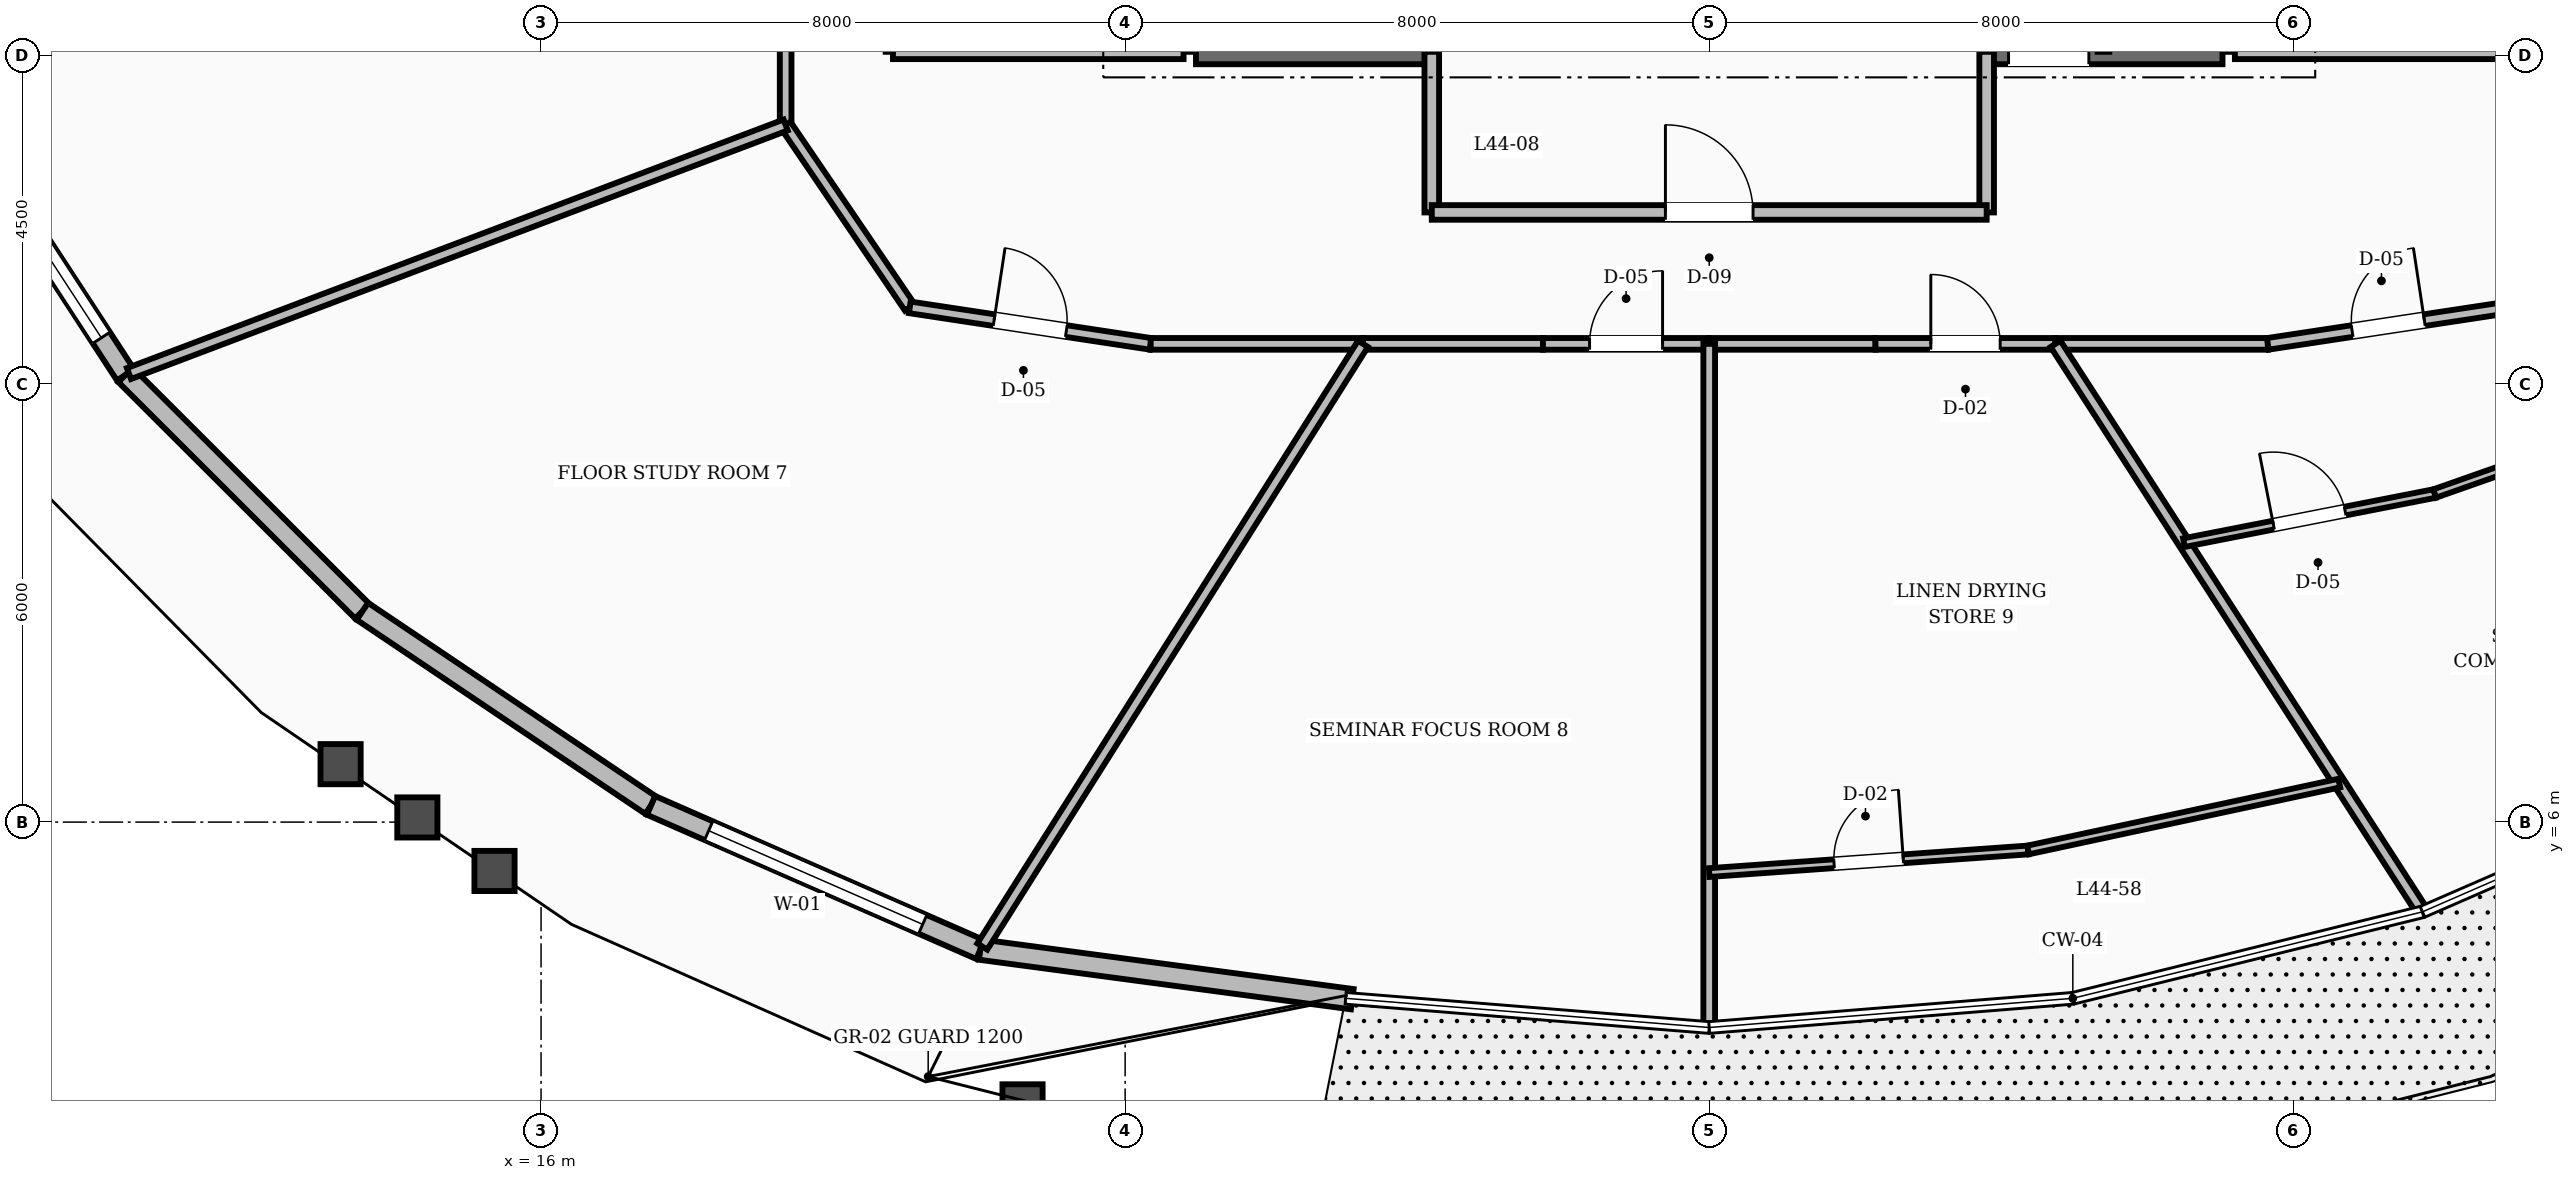
"""IFC4 building model, lengths in metres.
Left out: names, types, materials, properties, quantities, classifications, styles, units other than length and angle.
Written with IfcOpenShell. Run it as: python <this file> out.ifc"""

import sys

from ifc_helpers import new_model, si_unit, direction, frame, frame_2d, origin, place, context, subcontext, project, spatial, rectangle, extrude, element, fill, save


model = new_model("IFC4")
c1 = context("Model", 3, precision=1e-05, world=origin(), true_north=direction((0.0, 1.0)))
c2 = subcontext(c1, "Body", "Model", "MODEL_VIEW")
j1 = project(units=[si_unit("LENGTHUNIT", "METRE"), si_unit("PLANEANGLEUNIT", "RADIAN")], contexts=[c1])
p1 = place(None, origin())
s1 = spatial("IfcSite", under=j1, at=p1, CompositionType="ELEMENT")
p2 = place(p1, origin())
s2 = spatial("IfcBuilding", under=s1, at=p2, CompositionType="ELEMENT")
p3 = place(p2, frame((0.0, 0.0, 171.2)))
s3 = spatial("IfcBuildingStorey", under=s2, at=p3, CompositionType="ELEMENT", Elevation=171.2)
p4 = place(p3, frame((24.97, 16.55, 0.0), z_axis=(0.0, 0.0, 1.0), x_axis=(1.0, 0.0, 0.0)))
e1 = element("IfcWall", 1, at=p4, inside=s3, PredefinedType="SHEAR", context=c2, shape_type="SweptSolid", body=[
    extrude(rectangle(XDim=3.23, YDim=0.34, at=frame_2d((1.615, 0.0))), origin(), (0.0, 0.0, 1.0), 3.6),
])
p5 = place(p3, frame((35.8, 16.55, 0.0), z_axis=(0.0, 0.0, 1.0), x_axis=(1.0, 0.0, 0.0)))
e2 = element("IfcWall", 2, at=p5, inside=s3, PredefinedType="SHEAR", context=c2, shape_type="SweptSolid", body=[
    extrude(rectangle(XDim=3.23, YDim=0.34, at=frame_2d((1.615, 0.0))), origin(), (0.0, 0.0, 1.0), 3.6),
])
p6 = place(p5, frame((0.3, 0.0, 0.0)))
e3 = element("IfcOpeningElement", 3, at=p6, cuts=e2, PredefinedType="OPENING", context=c2, shape_type="SweptSolid", body=[
    extrude(rectangle(XDim=1.1, YDim=2.1, at=frame_2d((0.55, 1.05))), frame((0.0, 0.18, 0.0), z_axis=(0.0, -1.0, 0.0), x_axis=(1.0, 0.0, 0.0)), (0.0, 0.0, 1.0), 0.36),
])
p7 = place(p3, frame((7.898, 15.821, 0.0), z_axis=(0.0, 0.0, 1.0), x_axis=(0.546411241489, -0.837517017841, 0.0)))
e4 = element("IfcWall", 4, at=p7, inside=s3, PredefinedType="STANDARD", context=c2, shape_type="SweptSolid", body=[
    extrude(rectangle(XDim=4.412, YDim=0.28, at=frame_2d((2.206, 0.0))), origin(), (0.0, 0.0, 1.0), 2.82),
])
p8 = place(p7, frame((0.606, 0.0, 0.8)))
e5 = element("IfcOpeningElement", 5, at=p8, cuts=e4, PredefinedType="OPENING", context=c2, shape_type="SweptSolid", body=[
    extrude(rectangle(XDim=3.2, YDim=1.65, at=frame_2d((1.6, 0.825))), frame((0.0, 0.15, 0.0), z_axis=(0.0, -1.0, 0.0), x_axis=(1.0, 0.0, 0.0)), (0.0, 0.0, 1.0), 0.3),
])
p9 = place(p3, frame((10.309, 12.125, 0.0), z_axis=(0.0, 0.0, 1.0), x_axis=(0.707692376563, -0.706520700443, 0.0)))
e6 = element("IfcWall", 6, at=p9, inside=s3, PredefinedType="STANDARD", context=c2, shape_type="SweptSolid", body=[
    extrude(rectangle(XDim=4.584, YDim=0.28, at=frame_2d((2.292, 0.0))), origin(), (0.0, 0.0, 1.0), 2.82),
])
p10 = place(p3, frame((13.553, 8.887, 0.0), z_axis=(0.0, 0.0, 1.0), x_axis=(0.82985197946, -0.557983594909, 0.0)))
e7 = element("IfcWall", 7, at=p10, inside=s3, PredefinedType="STANDARD", context=c2, shape_type="SweptSolid", body=[
    extrude(rectangle(XDim=4.764, YDim=0.28, at=frame_2d((2.382, 0.0))), origin(), (0.0, 0.0, 1.0), 2.82),
])
p11 = place(p3, frame((17.506, 6.229, 0.0), z_axis=(0.0, 0.0, 1.0), x_axis=(0.916018444192, -0.401136148832, 0.0)))
e8 = element("IfcWall", 8, at=p11, inside=s3, PredefinedType="STANDARD", context=c2, shape_type="SweptSolid", body=[
    extrude(rectangle(XDim=4.924, YDim=0.28, at=frame_2d((2.462, 0.0))), origin(), (0.0, 0.0, 1.0), 2.82),
])
p12 = place(p11, frame((0.862, 0.0, 0.8)))
e9 = element("IfcOpeningElement", 9, at=p12, cuts=e8, PredefinedType="OPENING", context=c2, shape_type="SweptSolid", body=[
    extrude(rectangle(XDim=3.2, YDim=1.65, at=frame_2d((1.6, 0.825))), frame((0.0, 0.15, 0.0), z_axis=(0.0, -1.0, 0.0), x_axis=(1.0, 0.0, 0.0)), (0.0, 0.0, 1.0), 0.3),
])
p13 = place(p3, frame((22.017, 4.253, 0.0), z_axis=(0.0, 0.0, 1.0), x_axis=(0.991229560072, -0.132151274075, 0.0)))
e10 = element("IfcWall", 10, at=p13, inside=s3, PredefinedType="STANDARD", context=c2, shape_type="SweptSolid", body=[
    extrude(rectangle(XDim=5.14, YDim=0.28, at=frame_2d((2.57, 0.0))), origin(), (0.0, 0.0, 1.0), 2.82),
])
for number, where, z_axis, x_axis in (
    (11, (20.82, 16.55, 0.0), (0.0, 0.0, 1.0), (1.0, 0.0, 0.0)),
    (12, (39.2, 16.55, 0.0), (0.0, 0.0, 1.0), (1.0, 0.0, 0.0)),
):
    element("IfcWall", number, at=place(p3, frame(where, z_axis=z_axis, x_axis=x_axis)), inside=s3, PredefinedType="SOLIDWALL", context=c2, shape_type="SweptSolid", body=[
        extrude(rectangle(XDim=3.98, YDim=0.2, at=frame_2d((1.99, 0.0))), origin(), (0.0, 0.0, 1.0), 2.8),
    ])
for number, where, z_axis, x_axis in (
    (13, (28.2, 14.35, 0.0), (0.0, 0.0, 1.0), (0.0, 1.0, 0.0)),
    (14, (35.8, 14.35, 0.0), (0.0, 0.0, 1.0), (0.0, 1.0, 0.0)),
):
    element("IfcWall", number, at=place(p3, frame(where, z_axis=z_axis, x_axis=x_axis)), inside=s3, PredefinedType="SOLIDWALL", context=c2, shape_type="SweptSolid", body=[
        extrude(rectangle(XDim=2.2, YDim=0.2, at=frame_2d((1.1, 0.0))), origin(), (0.0, 0.0, 1.0), 2.8),
    ])
p14 = place(p3, frame((28.2, 14.35, 0.0), z_axis=(0.0, 0.0, 1.0), x_axis=(1.0, 0.0, 0.0)))
e15 = element("IfcWall", 15, at=p14, inside=s3, PredefinedType="SOLIDWALL", context=c2, shape_type="SweptSolid", body=[
    extrude(rectangle(XDim=7.6, YDim=0.2, at=frame_2d((3.8, 0.0))), origin(), (0.0, 0.0, 1.0), 2.8),
])
p15 = place(p14, frame((3.2, 0.0, 0.0)))
e16 = element("IfcOpeningElement", 16, at=p15, cuts=e15, PredefinedType="OPENING", context=c2, shape_type="SweptSolid", body=[
    extrude(rectangle(XDim=1.2, YDim=2.1, at=frame_2d((0.6, 1.05))), frame((0.0, 0.11, 0.0), z_axis=(0.0, -1.0, 0.0), x_axis=(1.0, 0.0, 0.0)), (0.0, 0.0, 1.0), 0.22),
])
p16 = place(p3, frame((19.35, 18.76, 0.0), z_axis=(0.0, 0.0, 1.0), x_axis=(0.0, -1.0, 0.0)))
e17 = element("IfcWall", 17, at=p16, inside=s3, PredefinedType="SOLIDWALL", context=c2, shape_type="SweptSolid", body=[
    extrude(rectangle(XDim=3.213, YDim=0.16, at=frame_2d((1.606, 0.0))), origin(), (0.0, 0.0, 1.0), 2.8),
])
p17 = place(p3, frame((19.35, 15.548, 0.0), z_axis=(0.0, 0.0, 1.0), x_axis=(0.562674669208, -0.826678423955, 0.0)))
e18 = element("IfcWall", 18, at=p17, inside=s3, PredefinedType="SOLIDWALL", context=c2, shape_type="SweptSolid", body=[
    extrude(rectangle(XDim=3.021, YDim=0.16, at=frame_2d((1.511, 0.0))), origin(), (0.0, 0.0, 1.0), 2.8),
])
p18 = place(p3, frame((21.05, 13.05, 0.0), z_axis=(0.0, 0.0, 1.0), x_axis=(0.988710906508, -0.149835721217, 0.0)))
e19 = element("IfcWall", 19, at=p18, inside=s3, PredefinedType="SOLIDWALL", context=c2, shape_type="SweptSolid", body=[
    extrude(rectangle(XDim=3.337, YDim=0.16, at=frame_2d((1.668, 0.0))), origin(), (0.0, 0.0, 1.0), 2.8),
])
p19 = place(p18, frame((1.168, 0.0, 0.0)))
e20 = element("IfcOpeningElement", 20, at=p19, cuts=e19, PredefinedType="OPENING", context=c2, shape_type="SweptSolid", body=[
    extrude(rectangle(XDim=1.0, YDim=2.1, at=frame_2d((0.5, 1.05))), frame((0.0, 0.09, 0.0), z_axis=(0.0, -1.0, 0.0), x_axis=(1.0, 0.0, 0.0)), (0.0, 0.0, 1.0), 0.18),
])
p20 = place(p3, frame((24.349, 12.55, 0.0), z_axis=(0.0, 0.0, 1.0), x_axis=(1.0, 0.0, 0.0)))
e21 = element("IfcWall", 21, at=p20, inside=s3, PredefinedType="SOLIDWALL", context=c2, shape_type="SweptSolid", body=[
    extrude(rectangle(XDim=2.908, YDim=0.16, at=frame_2d((1.454, 0.0))), origin(), (0.0, 0.0, 1.0), 2.8),
])
p21 = place(p3, frame((27.257, 12.55, 0.0), z_axis=(0.0, 0.0, 1.0), x_axis=(1.0, 0.0, 0.0)))
e22 = element("IfcWall", 22, at=p21, inside=s3, PredefinedType="SOLIDWALL", context=c2, shape_type="SweptSolid", body=[
    extrude(rectangle(XDim=2.465, YDim=0.16, at=frame_2d((1.232, 0.0))), origin(), (0.0, 0.0, 1.0), 2.8),
])
p22 = place(p3, frame((29.722, 12.55, 0.0), z_axis=(0.0, 0.0, 1.0), x_axis=(1.0, 0.0, 0.0)))
e23 = element("IfcWall", 23, at=p22, inside=s3, PredefinedType="SOLIDWALL", context=c2, shape_type="SweptSolid", body=[
    extrude(rectangle(XDim=2.278, YDim=0.16, at=frame_2d((1.139, 0.0))), origin(), (0.0, 0.0, 1.0), 2.8),
])
p23 = place(p22, frame((0.639, 0.0, 0.0)))
e24 = element("IfcOpeningElement", 24, at=p23, cuts=e23, PredefinedType="OPENING", context=c2, shape_type="SweptSolid", body=[
    extrude(rectangle(XDim=1.0, YDim=2.1, at=frame_2d((0.5, 1.05))), frame((0.0, 0.09, 0.0), z_axis=(0.0, -1.0, 0.0), x_axis=(1.0, 0.0, 0.0)), (0.0, 0.0, 1.0), 0.18),
])
p24 = place(p3, frame((32.0, 12.55, 0.0), z_axis=(0.0, 0.0, 1.0), x_axis=(1.0, 0.0, 0.0)))
e25 = element("IfcWall", 25, at=p24, inside=s3, PredefinedType="SOLIDWALL", context=c2, shape_type="SweptSolid", body=[
    extrude(rectangle(XDim=2.278, YDim=0.16, at=frame_2d((1.139, 0.0))), origin(), (0.0, 0.0, 1.0), 2.8),
])
p25 = place(p3, frame((34.278, 12.55, 0.0), z_axis=(0.0, 0.0, 1.0), x_axis=(1.0, 0.0, 0.0)))
e26 = element("IfcWall", 26, at=p25, inside=s3, PredefinedType="SOLIDWALL", context=c2, shape_type="SweptSolid", body=[
    extrude(rectangle(XDim=2.465, YDim=0.16, at=frame_2d((1.232, 0.0))), origin(), (0.0, 0.0, 1.0), 2.8),
])
p26 = place(p25, frame((0.758, 0.0, 0.0)))
e27 = element("IfcOpeningElement", 27, at=p26, cuts=e26, PredefinedType="OPENING", context=c2, shape_type="SweptSolid", body=[
    extrude(rectangle(XDim=0.95, YDim=2.1, at=frame_2d((0.475, 1.05))), frame((0.0, 0.09, 0.0), z_axis=(0.0, -1.0, 0.0), x_axis=(1.0, 0.0, 0.0)), (0.0, 0.0, 1.0), 0.18),
])
p27 = place(p3, frame((36.743, 12.55, 0.0), z_axis=(0.0, 0.0, 1.0), x_axis=(1.0, 0.0, 0.0)))
e28 = element("IfcWall", 28, at=p27, inside=s3, PredefinedType="SOLIDWALL", context=c2, shape_type="SweptSolid", body=[
    extrude(rectangle(XDim=2.908, YDim=0.16, at=frame_2d((1.454, 0.0))), origin(), (0.0, 0.0, 1.0), 2.8),
])
p28 = place(p3, frame((39.651, 12.55, 0.0), z_axis=(0.0, 0.0, 1.0), x_axis=(0.988710906508, 0.149835721217, 0.0)))
e29 = element("IfcWall", 29, at=p28, inside=s3, PredefinedType="SOLIDWALL", context=c2, shape_type="SweptSolid", body=[
    extrude(rectangle(XDim=3.337, YDim=0.16, at=frame_2d((1.668, 0.0))), origin(), (0.0, 0.0, 1.0), 2.8),
])
p29 = place(p28, frame((1.168, 0.0, 0.0)))
e30 = element("IfcOpeningElement", 30, at=p29, cuts=e29, PredefinedType="OPENING", context=c2, shape_type="SweptSolid", body=[
    extrude(rectangle(XDim=1.0, YDim=2.1, at=frame_2d((0.5, 1.05))), frame((0.0, 0.09, 0.0), z_axis=(0.0, -1.0, 0.0), x_axis=(1.0, 0.0, 0.0)), (0.0, 0.0, 1.0), 0.18),
])
p30 = place(p3, frame((36.743, 12.55, 0.0), z_axis=(0.0, 0.0, 1.0), x_axis=(0.542698414849, -0.839927634097, 0.0)))
e31 = element("IfcWall", 31, at=p30, inside=s3, PredefinedType="SOLIDWALL", context=c2, shape_type="SweptSolid", body=[
    extrude(rectangle(XDim=9.212, YDim=0.16, at=frame_2d((4.606, 0.0))), origin(), (0.0, 0.0, 1.0), 2.8),
])
p31 = place(p3, frame((38.502, 9.827, 0.0), z_axis=(0.0, 0.0, 1.0), x_axis=(0.981335177807, 0.192305145015, 0.0)))
e32 = element("IfcWall", 32, at=p31, inside=s3, PredefinedType="PARTITIONING", context=c2, shape_type="SweptSolid", body=[
    extrude(rectangle(XDim=3.5, YDim=0.12, at=frame_2d((1.75, 0.0))), origin(), (0.0, 0.0, 1.0), 2.8),
])
p32 = place(p31, frame((1.25, 0.0, 0.0)))
e33 = element("IfcOpeningElement", 33, at=p32, cuts=e32, PredefinedType="OPENING", context=c2, shape_type="SweptSolid", body=[
    extrude(rectangle(XDim=1.0, YDim=2.1, at=frame_2d((0.5, 1.05))), frame((0.0, 0.07, 0.0), z_axis=(0.0, -1.0, 0.0), x_axis=(1.0, 0.0, 0.0)), (0.0, 0.0, 1.0), 0.14),
])
p33 = place(p3, frame((41.937, 10.5, 0.0), z_axis=(0.0, 0.0, 1.0), x_axis=(0.943313154173, 0.331904042103, 0.0)))
e34 = element("IfcWall", 34, at=p33, inside=s3, PredefinedType="PARTITIONING", context=c2, shape_type="SweptSolid", body=[
    extrude(rectangle(XDim=3.709, YDim=0.12, at=frame_2d((1.854, 0.0))), origin(), (0.0, 0.0, 1.0), 2.8),
])
p34 = place(p3, frame((19.35, 15.548, 0.0), z_axis=(0.0, 0.0, 1.0), x_axis=(-0.935251280016, -0.353984523996, 0.0)))
e35 = element("IfcWall", 35, at=p34, inside=s3, PredefinedType="SOLIDWALL", context=c2, shape_type="SweptSolid", body=[
    extrude(rectangle(XDim=9.617, YDim=0.16, at=frame_2d((4.809, 0.0))), origin(), (0.0, 0.0, 1.0), 2.8),
])
p35 = place(p3, frame((27.257, 12.55, 0.0), z_axis=(0.0, 0.0, 1.0), x_axis=(-0.534063552389, -0.845444334069, 0.0)))
e36 = element("IfcWall", 36, at=p35, inside=s3, PredefinedType="SOLIDWALL", context=c2, shape_type="SweptSolid", body=[
    extrude(rectangle(XDim=9.763, YDim=0.16, at=frame_2d((4.882, 0.0))), origin(), (0.0, 0.0, 1.0), 2.8),
])
p36 = place(p3, frame((32.0, 12.55, 0.0), z_axis=(0.0, 0.0, 1.0), x_axis=(0.0, -1.0, 0.0)))
e37 = element("IfcWall", 37, at=p36, inside=s3, PredefinedType="SOLIDWALL", context=c2, shape_type="SweptSolid", body=[
    extrude(rectangle(XDim=9.313, YDim=0.16, at=frame_2d((4.657, 0.0))), origin(), (0.0, 0.0, 1.0), 2.8),
])
p37 = place(p3, frame((32.0, 5.309, 0.0), z_axis=(0.0, 0.0, 1.0), x_axis=(0.997501538999, 0.070644742868, 0.0)))
e38 = element("IfcWall", 38, at=p37, inside=s3, PredefinedType="PARTITIONING", context=c2, shape_type="SweptSolid", body=[
    extrude(rectangle(XDim=4.379, YDim=0.12, at=frame_2d((2.189, 0.0))), origin(), (0.0, 0.0, 1.0), 2.8),
])
p38 = place(p37, frame((1.714, 0.0, 0.0)))
e39 = element("IfcOpeningElement", 39, at=p38, cuts=e38, PredefinedType="OPENING", context=c2, shape_type="SweptSolid", body=[
    extrude(rectangle(XDim=0.95, YDim=2.1, at=frame_2d((0.475, 1.05))), frame((0.0, 0.07, 0.0), z_axis=(0.0, -1.0, 0.0), x_axis=(1.0, 0.0, 0.0)), (0.0, 0.0, 1.0), 0.14),
])
p39 = place(p3, frame((36.368, 5.618, 0.0), z_axis=(0.0, 0.0, 1.0), x_axis=(0.977676028199, 0.210118023703, 0.0)))
e40 = element("IfcWall", 40, at=p39, inside=s3, PredefinedType="PARTITIONING", context=c2, shape_type="SweptSolid", body=[
    extrude(rectangle(XDim=4.36, YDim=0.12, at=frame_2d((2.18, 0.0))), origin(), (0.0, 0.0, 1.0), 2.8),
])
p40 = place(p8, origin())
e41 = element("IfcWindow", 41, at=p40, inside=s3, PartitioningType="SINGLE_PANEL", PredefinedType="WINDOW", context=c2, shape_type="SweptSolid", body=[
    extrude(rectangle(XDim=3.2, YDim=1.65, at=frame_2d((1.6, 0.825))), frame((0.0, 0.03, 0.0), z_axis=(0.0, -1.0, 0.0), x_axis=(1.0, 0.0, 0.0)), (0.0, 0.0, 1.0), 0.06),
])
fill(e5, e41)
p41 = place(p12, origin())
e42 = element("IfcWindow", 42, at=p41, inside=s3, PartitioningType="SINGLE_PANEL", PredefinedType="WINDOW", context=c2, shape_type="SweptSolid", body=[
    extrude(rectangle(XDim=3.2, YDim=1.65, at=frame_2d((1.6, 0.825))), frame((0.0, 0.03, 0.0), z_axis=(0.0, -1.0, 0.0), x_axis=(1.0, 0.0, 0.0)), (0.0, 0.0, 1.0), 0.06),
])
fill(e9, e42)
p42 = place(p6, origin())
e43 = element("IfcDoor", 43, at=p42, inside=s3, OperationType="SINGLE_SWING_RIGHT", PredefinedType="DOOR", context=c2, shape_type="SweptSolid", body=[
    extrude(rectangle(XDim=1.1, YDim=2.1, at=frame_2d((0.55, 1.05))), frame((0.0, 0.025, 0.0), z_axis=(0.0, -1.0, 0.0), x_axis=(1.0, 0.0, 0.0)), (0.0, 0.0, 1.0), 0.05),
])
fill(e3, e43)
p43 = place(p15, origin())
e44 = element("IfcDoor", 44, at=p43, inside=s3, OperationType="SINGLE_SWING_LEFT", PredefinedType="DOOR", context=c2, shape_type="SweptSolid", body=[
    extrude(rectangle(XDim=1.2, YDim=2.1, at=frame_2d((0.6, 1.05))), frame((0.0, 0.025, 0.0), z_axis=(0.0, -1.0, 0.0), x_axis=(1.0, 0.0, 0.0)), (0.0, 0.0, 1.0), 0.05),
])
fill(e16, e44)
p44 = place(p29, origin())
e45 = element("IfcDoor", 45, at=p44, inside=s3, OperationType="SINGLE_SWING_RIGHT", PredefinedType="DOOR", context=c2, shape_type="SweptSolid", body=[
    extrude(rectangle(XDim=1.0, YDim=2.1, at=frame_2d((0.5, 1.05))), frame((0.0, 0.025, 0.0), z_axis=(0.0, -1.0, 0.0), x_axis=(1.0, 0.0, 0.0)), (0.0, 0.0, 1.0), 0.05),
])
fill(e30, e45)
p45 = place(p32, origin())
e46 = element("IfcDoor", 46, at=p45, inside=s3, OperationType="SINGLE_SWING_LEFT", PredefinedType="DOOR", context=c2, shape_type="SweptSolid", body=[
    extrude(rectangle(XDim=1.0, YDim=2.1, at=frame_2d((0.5, 1.05))), frame((0.0, 0.025, 0.0), z_axis=(0.0, -1.0, 0.0), x_axis=(1.0, 0.0, 0.0)), (0.0, 0.0, 1.0), 0.05),
])
fill(e33, e46)
p46 = place(p19, origin())
e47 = element("IfcDoor", 47, at=p46, inside=s3, OperationType="SINGLE_SWING_LEFT", PredefinedType="DOOR", context=c2, shape_type="SweptSolid", body=[
    extrude(rectangle(XDim=1.0, YDim=2.1, at=frame_2d((0.5, 1.05))), frame((0.0, 0.025, 0.0), z_axis=(0.0, -1.0, 0.0), x_axis=(1.0, 0.0, 0.0)), (0.0, 0.0, 1.0), 0.05),
])
fill(e20, e47)
p47 = place(p23, origin())
e48 = element("IfcDoor", 48, at=p47, inside=s3, OperationType="SINGLE_SWING_RIGHT", PredefinedType="DOOR", context=c2, shape_type="SweptSolid", body=[
    extrude(rectangle(XDim=1.0, YDim=2.1, at=frame_2d((0.5, 1.05))), frame((0.0, 0.025, 0.0), z_axis=(0.0, -1.0, 0.0), x_axis=(1.0, 0.0, 0.0)), (0.0, 0.0, 1.0), 0.05),
])
fill(e24, e48)
p48 = place(p26, origin())
e49 = element("IfcDoor", 49, at=p48, inside=s3, OperationType="SINGLE_SWING_LEFT", PredefinedType="DOOR", context=c2, shape_type="SweptSolid", body=[
    extrude(rectangle(XDim=0.95, YDim=2.1, at=frame_2d((0.475, 1.05))), frame((0.0, 0.025, 0.0), z_axis=(0.0, -1.0, 0.0), x_axis=(1.0, 0.0, 0.0)), (0.0, 0.0, 1.0), 0.05),
])
fill(e27, e49)
p49 = place(p38, origin())
e50 = element("IfcDoor", 50, at=p49, inside=s3, OperationType="SINGLE_SWING_RIGHT", PredefinedType="DOOR", context=c2, shape_type="SweptSolid", body=[
    extrude(rectangle(XDim=0.95, YDim=2.1, at=frame_2d((0.475, 1.05))), frame((0.0, 0.025, 0.0), z_axis=(0.0, -1.0, 0.0), x_axis=(1.0, 0.0, 0.0)), (0.0, 0.0, 1.0), 0.05),
])
fill(e39, e50)
save(model, sys.argv[1])
